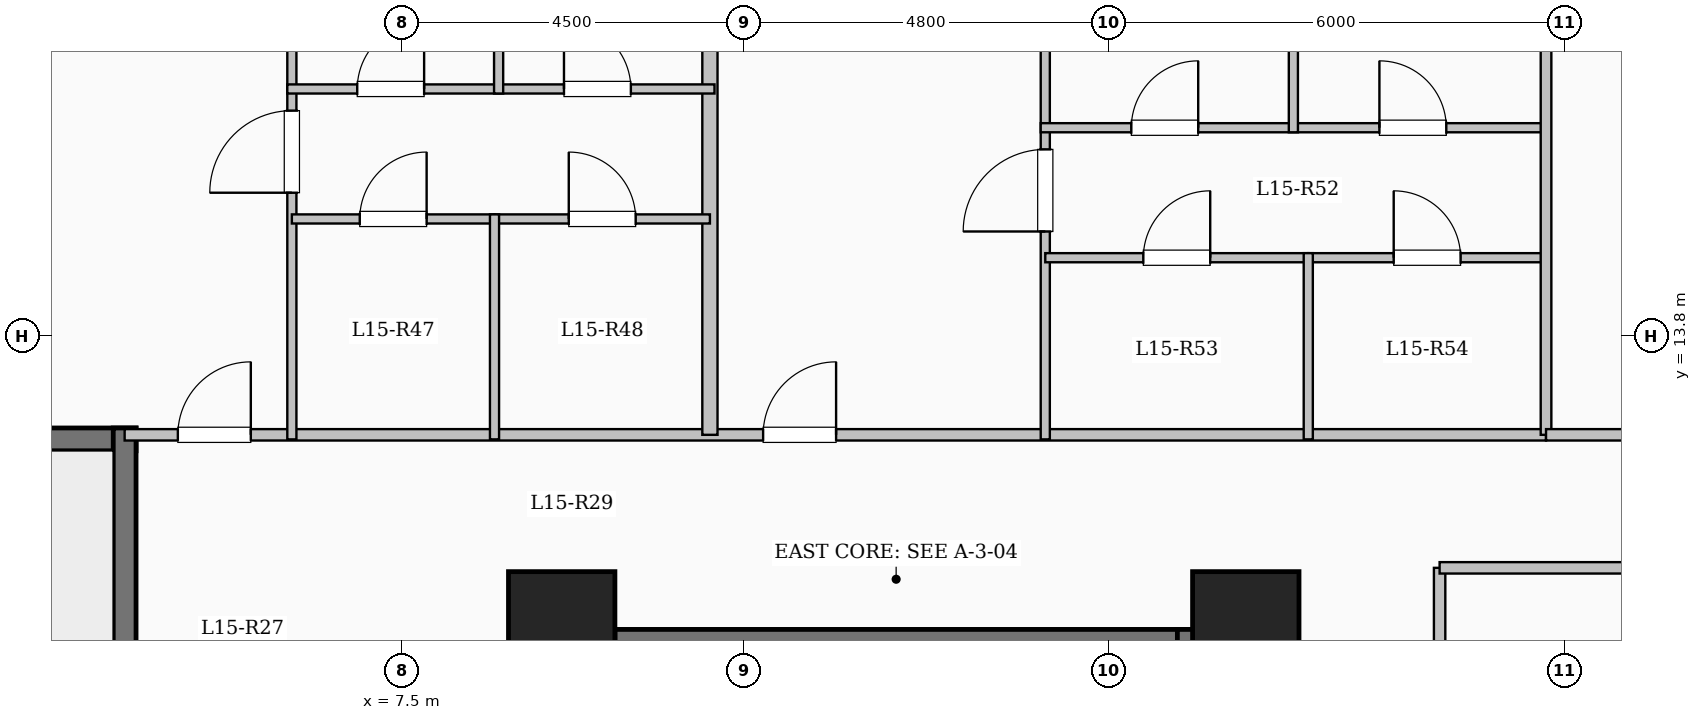
"""IFC4 building model, lengths in metres.
Left out: names, types, materials, properties, quantities, classifications, styles, units other than length and angle.
Written with IfcOpenShell. Run it as: python <this file> out.ifc"""

import sys

from ifc_helpers import new_model, si_unit, direction, frame, frame_2d, origin, origin_2d, place, context, subcontext, project, spatial, rectangle, extrude, element, fill, save


model = new_model("IFC4")
c1 = context("Model", 3, precision=1e-05, world=origin(), true_north=direction((0.0, 1.0)))
c2 = subcontext(c1, "Body", "Model", "MODEL_VIEW")
j1 = project(units=[si_unit("LENGTHUNIT", "METRE"), si_unit("PLANEANGLEUNIT", "RADIAN")], contexts=[c1])
p1 = place(None, origin())
s1 = spatial("IfcSite", under=j1, at=p1, CompositionType="ELEMENT")
p2 = place(p1, origin())
s2 = spatial("IfcBuilding", under=s1, at=p2, CompositionType="ELEMENT")
p3 = place(p2, frame((0.0, 0.0, 57.5)))
s3 = spatial("IfcBuildingStorey", under=s2, at=p3, CompositionType="ELEMENT", Elevation=57.5)
for number, where, z_axis, x_axis in (
    (1, (9.6, 10.0, 0.0), (0.0, 0.0, 1.0), (1.0, 0.0, 0.0)),
    (2, (18.6, 10.0, 0.0), (0.0, 0.0, 1.0), (1.0, 0.0, 0.0)),
):
    element("IfcColumn", number, at=place(p3, frame(where, z_axis=z_axis, x_axis=x_axis)), inside=s3, PredefinedType="COLUMN", context=c2, shape_type="SweptSolid", body=[
        extrude(rectangle(XDim=1.4, YDim=1.4, at=origin_2d()), origin(), (0.0, 0.0, 1.0), 3.35),
    ])
p4 = place(p3, frame((10.0, 9.79, 0.0), z_axis=(0.0, 0.0, 1.0), x_axis=(1.0, 0.0, 0.0)))
e3 = element("IfcWall", 3, at=p4, inside=s3, PredefinedType="SHEAR", context=c2, shape_type="SweptSolid", body=[
    extrude(rectangle(XDim=8.0, YDim=0.3, at=frame_2d((4.0, 0.0))), origin(), (0.0, 0.0, 1.0), 3.35),
])
for number, where, z_axis, x_axis in (
    (4, (10.15, 6.35, 0.0), (0.0, 0.0, 1.0), (0.0, 1.0, 0.0)),
    (5, (17.85, 6.35, 0.0), (0.0, 0.0, 1.0), (0.0, 1.0, 0.0)),
):
    element("IfcWall", number, at=place(p3, frame(where, z_axis=z_axis, x_axis=x_axis)), inside=s3, PredefinedType="SHEAR", context=c2, shape_type="SweptSolid", body=[
        extrude(rectangle(XDim=3.59, YDim=0.3, at=frame_2d((1.795, 0.0))), origin(), (0.0, 0.0, 1.0), 3.35),
    ])
p5 = place(p3, frame((-4.0, 12.44, 0.0), z_axis=(0.0, 0.0, 1.0), x_axis=(1.0, 0.0, 0.0)))
e6 = element("IfcWall", 6, at=p5, inside=s3, PredefinedType="SHEAR", context=c2, shape_type="SweptSolid", body=[
    extrude(rectangle(XDim=8.0, YDim=0.3, at=frame_2d((4.0, 0.0))), origin(), (0.0, 0.0, 1.0), 3.35),
])
p6 = place(p3, frame((3.85, 9.0, 0.0), z_axis=(0.0, 0.0, 1.0), x_axis=(0.0, 1.0, 0.0)))
e7 = element("IfcWall", 7, at=p6, inside=s3, PredefinedType="SHEAR", context=c2, shape_type="SweptSolid", body=[
    extrude(rectangle(XDim=3.59, YDim=0.3, at=frame_2d((1.795, 0.0))), origin(), (0.0, 0.0, 1.0), 3.35),
])
p7 = place(p3, frame((3.85, 12.5, 0.0), z_axis=(0.0, 0.0, 1.0), x_axis=(1.0, 0.0, 0.0)))
e8 = element("IfcWall", 8, at=p7, inside=s3, PredefinedType="PARTITIONING", context=c2, shape_type="SweptSolid", body=[
    extrude(rectangle(XDim=18.7, YDim=0.15, at=frame_2d((9.35, 0.0))), origin(), (0.0, 0.0, 1.0), 3.1),
])
p8 = place(p7, frame((0.7, 0.0, 0.0)))
e9 = element("IfcOpeningElement", 9, at=p8, cuts=e8, PredefinedType="OPENING", context=c2, shape_type="SweptSolid", body=[
    extrude(rectangle(XDim=0.96, YDim=2.15, at=frame_2d((0.48, 1.075))), frame((0.0, 0.085, 0.0), z_axis=(0.0, -1.0, 0.0), x_axis=(1.0, 0.0, 0.0)), (0.0, 0.0, 1.0), 0.17),
])
p9 = place(p7, frame((8.4, 0.0, 0.0)))
e10 = element("IfcOpeningElement", 10, at=p9, cuts=e8, PredefinedType="OPENING", context=c2, shape_type="SweptSolid", body=[
    extrude(rectangle(XDim=0.96, YDim=2.15, at=frame_2d((0.48, 1.075))), frame((0.0, 0.085, 0.0), z_axis=(0.0, -1.0, 0.0), x_axis=(1.0, 0.0, 0.0)), (0.0, 0.0, 1.0), 0.17),
])
p10 = place(p3, frame((21.15, -7.25, 0.0), z_axis=(0.0, 0.0, 1.0), x_axis=(0.0, 1.0, 0.0)))
e11 = element("IfcWall", 11, at=p10, inside=s3, PredefinedType="PARTITIONING", context=c2, shape_type="SweptSolid", body=[
    extrude(rectangle(XDim=18.0, YDim=0.15, at=frame_2d((9.0, 0.0))), origin(), (0.0, 0.0, 1.0), 2.585),
])
p11 = place(p3, frame((11.55, 12.5, 0.0), z_axis=(0.0, 0.0, 1.0), x_axis=(0.0, 1.0, 0.0)))
e12 = element("IfcWall", 12, at=p11, inside=s3, PredefinedType="SOLIDWALL", context=c2, shape_type="SweptSolid", body=[
    extrude(rectangle(XDim=11.1, YDim=0.2, at=frame_2d((5.55, 0.0))), origin(), (0.0, 0.0, 1.0), 3.1),
])
p12 = place(p3, frame((6.05, 12.44, 0.0), z_axis=(0.0, 0.0, 1.0), x_axis=(0.0, 1.0, 0.0)))
e13 = element("IfcWall", 13, at=p12, inside=s3, PredefinedType="PARTITIONING", context=c2, shape_type="SweptSolid", body=[
    extrude(rectangle(XDim=12.381, YDim=0.12, at=frame_2d((6.19, 0.0))), origin(), (0.0, 0.0, 1.0), 3.1),
])
p13 = place(p12, frame((3.245, 0.0, 0.0)))
e14 = element("IfcOpeningElement", 14, at=p13, cuts=e13, PredefinedType="OPENING", context=c2, shape_type="SweptSolid", body=[
    extrude(rectangle(XDim=1.08, YDim=2.15, at=frame_2d((0.54, 1.075))), frame((0.0, 0.07, 0.0), z_axis=(0.0, -1.0, 0.0), x_axis=(1.0, 0.0, 0.0)), (0.0, 0.0, 1.0), 0.14),
])
p14 = place(p3, frame((6.05, 15.34, 0.0), z_axis=(0.0, 0.0, 1.0), x_axis=(1.0, 0.0, 0.0)))
e15 = element("IfcWall", 15, at=p14, inside=s3, PredefinedType="PARTITIONING", context=c2, shape_type="SweptSolid", body=[
    extrude(rectangle(XDim=2.666, YDim=0.12, at=frame_2d((1.333, 0.0))), origin(), (0.0, 0.0, 1.0), 3.1),
])
p15 = place(p14, frame((0.893, 0.0, 0.0)))
e16 = element("IfcOpeningElement", 16, at=p15, cuts=e15, PredefinedType="OPENING", context=c2, shape_type="SweptSolid", body=[
    extrude(rectangle(XDim=0.88, YDim=2.1, at=frame_2d((0.44, 1.05))), frame((0.0, 0.07, 0.0), z_axis=(0.0, -1.0, 0.0), x_axis=(1.0, 0.0, 0.0)), (0.0, 0.0, 1.0), 0.14),
])
p16 = place(p3, frame((8.716, 15.34, 0.0), z_axis=(0.0, 0.0, 1.0), x_axis=(1.0, 0.0, 0.0)))
e17 = element("IfcWall", 17, at=p16, inside=s3, PredefinedType="PARTITIONING", context=c2, shape_type="SweptSolid", body=[
    extrude(rectangle(XDim=2.834, YDim=0.12, at=frame_2d((1.417, 0.0))), origin(), (0.0, 0.0, 1.0), 3.1),
])
p17 = place(p16, frame((0.977, 0.0, 0.0)))
e18 = element("IfcOpeningElement", 18, at=p17, cuts=e17, PredefinedType="OPENING", context=c2, shape_type="SweptSolid", body=[
    extrude(rectangle(XDim=0.88, YDim=2.1, at=frame_2d((0.44, 1.05))), frame((0.0, 0.07, 0.0), z_axis=(0.0, -1.0, 0.0), x_axis=(1.0, 0.0, 0.0)), (0.0, 0.0, 1.0), 0.14),
])
p18 = place(p3, frame((5.99, 17.05, 0.0), z_axis=(0.0, 0.0, 1.0), x_axis=(1.0, 0.0, 0.0)))
e19 = element("IfcWall", 19, at=p18, inside=s3, PredefinedType="PARTITIONING", context=c2, shape_type="SweptSolid", body=[
    extrude(rectangle(XDim=5.62, YDim=0.12, at=frame_2d((2.81, 0.0))), origin(), (0.0, 0.0, 1.0), 3.1),
])
p19 = place(p18, frame((0.92, 0.0, 0.0)))
e20 = element("IfcOpeningElement", 20, at=p19, cuts=e19, PredefinedType="OPENING", context=c2, shape_type="SweptSolid", body=[
    extrude(rectangle(XDim=0.88, YDim=2.1, at=frame_2d((0.44, 1.05))), frame((0.0, 0.07, 0.0), z_axis=(0.0, -1.0, 0.0), x_axis=(1.0, 0.0, 0.0)), (0.0, 0.0, 1.0), 0.14),
])
p20 = place(p18, frame((3.64, 0.0, 0.0)))
e21 = element("IfcOpeningElement", 21, at=p20, cuts=e19, PredefinedType="OPENING", context=c2, shape_type="SweptSolid", body=[
    extrude(rectangle(XDim=0.88, YDim=2.1, at=frame_2d((0.44, 1.05))), frame((0.0, 0.07, 0.0), z_axis=(0.0, -1.0, 0.0), x_axis=(1.0, 0.0, 0.0)), (0.0, 0.0, 1.0), 0.14),
])
p21 = place(p3, frame((8.716, 12.44, 0.0), z_axis=(0.0, 0.0, 1.0), x_axis=(0.0, 1.0, 0.0)))
e22 = element("IfcWall", 22, at=p21, inside=s3, PredefinedType="PARTITIONING", context=c2, shape_type="SweptSolid", body=[
    extrude(rectangle(XDim=2.96, YDim=0.12, at=frame_2d((1.48, 0.0))), origin(), (0.0, 0.0, 1.0), 3.1),
])
p22 = place(p3, frame((8.77, 16.99, 0.0), z_axis=(0.0, 0.0, 1.0), x_axis=(0.0, 1.0, 0.0)))
e23 = element("IfcWall", 23, at=p22, inside=s3, PredefinedType="PARTITIONING", context=c2, shape_type="SweptSolid", body=[
    extrude(rectangle(XDim=7.16, YDim=0.12, at=frame_2d((3.58, 0.0))), origin(), (0.0, 0.0, 1.0), 3.1),
])
p23 = place(p3, frame((15.962, 12.44, 0.0), z_axis=(0.0, 0.0, 1.0), x_axis=(0.0, 1.0, 0.0)))
e24 = element("IfcWall", 24, at=p23, inside=s3, PredefinedType="PARTITIONING", context=c2, shape_type="SweptSolid", body=[
    extrude(rectangle(XDim=11.16, YDim=0.12, at=frame_2d((5.58, 0.0))), origin(), (0.0, 0.0, 1.0), 3.1),
])
p24 = place(p23, frame((2.735, 0.0, 0.0)))
e25 = element("IfcOpeningElement", 25, at=p24, cuts=e24, PredefinedType="OPENING", context=c2, shape_type="SweptSolid", body=[
    extrude(rectangle(XDim=1.08, YDim=2.15, at=frame_2d((0.54, 1.075))), frame((0.0, 0.07, 0.0), z_axis=(0.0, -1.0, 0.0), x_axis=(1.0, 0.0, 0.0)), (0.0, 0.0, 1.0), 0.14),
])
p25 = place(p3, frame((15.962, 14.83, 0.0), z_axis=(0.0, 0.0, 1.0), x_axis=(1.0, 0.0, 0.0)))
e26 = element("IfcWall", 26, at=p25, inside=s3, PredefinedType="PARTITIONING", context=c2, shape_type="SweptSolid", body=[
    extrude(rectangle(XDim=3.46, YDim=0.12, at=frame_2d((1.73, 0.0))), origin(), (0.0, 0.0, 1.0), 3.1),
])
p26 = place(p25, frame((1.29, 0.0, 0.0)))
e27 = element("IfcOpeningElement", 27, at=p26, cuts=e26, PredefinedType="OPENING", context=c2, shape_type="SweptSolid", body=[
    extrude(rectangle(XDim=0.88, YDim=2.1, at=frame_2d((0.44, 1.05))), frame((0.0, 0.07, 0.0), z_axis=(0.0, -1.0, 0.0), x_axis=(1.0, 0.0, 0.0)), (0.0, 0.0, 1.0), 0.14),
])
p27 = place(p3, frame((19.422, 14.83, 0.0), z_axis=(0.0, 0.0, 1.0), x_axis=(1.0, 0.0, 0.0)))
e28 = element("IfcWall", 28, at=p27, inside=s3, PredefinedType="PARTITIONING", context=c2, shape_type="SweptSolid", body=[
    extrude(rectangle(XDim=3.128, YDim=0.12, at=frame_2d((1.564, 0.0))), origin(), (0.0, 0.0, 1.0), 3.1),
])
p28 = place(p27, frame((1.124, 0.0, 0.0)))
e29 = element("IfcOpeningElement", 29, at=p28, cuts=e28, PredefinedType="OPENING", context=c2, shape_type="SweptSolid", body=[
    extrude(rectangle(XDim=0.88, YDim=2.1, at=frame_2d((0.44, 1.05))), frame((0.0, 0.07, 0.0), z_axis=(0.0, -1.0, 0.0), x_axis=(1.0, 0.0, 0.0)), (0.0, 0.0, 1.0), 0.14),
])
p29 = place(p3, frame((15.902, 16.54, 0.0), z_axis=(0.0, 0.0, 1.0), x_axis=(1.0, 0.0, 0.0)))
e30 = element("IfcWall", 30, at=p29, inside=s3, PredefinedType="PARTITIONING", context=c2, shape_type="SweptSolid", body=[
    extrude(rectangle(XDim=6.708, YDim=0.12, at=frame_2d((3.354, 0.0))), origin(), (0.0, 0.0, 1.0), 3.1),
])
p30 = place(p29, frame((1.192, 0.0, 0.0)))
e31 = element("IfcOpeningElement", 31, at=p30, cuts=e30, PredefinedType="OPENING", context=c2, shape_type="SweptSolid", body=[
    extrude(rectangle(XDim=0.88, YDim=2.1, at=frame_2d((0.44, 1.05))), frame((0.0, 0.07, 0.0), z_axis=(0.0, -1.0, 0.0), x_axis=(1.0, 0.0, 0.0)), (0.0, 0.0, 1.0), 0.14),
])
p31 = place(p29, frame((4.456, 0.0, 0.0)))
e32 = element("IfcOpeningElement", 32, at=p31, cuts=e30, PredefinedType="OPENING", context=c2, shape_type="SweptSolid", body=[
    extrude(rectangle(XDim=0.88, YDim=2.1, at=frame_2d((0.44, 1.05))), frame((0.0, 0.07, 0.0), z_axis=(0.0, -1.0, 0.0), x_axis=(1.0, 0.0, 0.0)), (0.0, 0.0, 1.0), 0.14),
])
p32 = place(p3, frame((19.422, 12.44, 0.0), z_axis=(0.0, 0.0, 1.0), x_axis=(0.0, 1.0, 0.0)))
e33 = element("IfcWall", 33, at=p32, inside=s3, PredefinedType="PARTITIONING", context=c2, shape_type="SweptSolid", body=[
    extrude(rectangle(XDim=2.45, YDim=0.12, at=frame_2d((1.225, 0.0))), origin(), (0.0, 0.0, 1.0), 3.1),
])
p33 = place(p3, frame((19.226, 16.48, 0.0), z_axis=(0.0, 0.0, 1.0), x_axis=(0.0, 1.0, 0.0)))
e34 = element("IfcWall", 34, at=p33, inside=s3, PredefinedType="PARTITIONING", context=c2, shape_type="SweptSolid", body=[
    extrude(rectangle(XDim=7.12, YDim=0.12, at=frame_2d((3.56, 0.0))), origin(), (0.0, 0.0, 1.0), 3.1),
])
p34 = place(p3, frame((21.15, 10.75, 0.0), z_axis=(0.0, 0.0, 1.0), x_axis=(1.0, 0.0, 0.0)))
e35 = element("IfcWall", 35, at=p34, inside=s3, PredefinedType="PARTITIONING", context=c2, shape_type="SweptSolid", body=[
    extrude(rectangle(XDim=7.53, YDim=0.15, at=frame_2d((3.765, 0.0))), origin(), (0.0, 0.0, 1.0), 3.1),
])
p35 = place(p3, frame((22.55, 12.5, 0.0), z_axis=(0.0, 0.0, 1.0), x_axis=(0.0, 1.0, 0.0)))
e36 = element("IfcWall", 36, at=p35, inside=s3, PredefinedType="PARTITIONING", context=c2, shape_type="SweptSolid", body=[
    extrude(rectangle(XDim=6.55, YDim=0.14, at=frame_2d((3.275, 0.0))), origin(), (0.0, 0.0, 1.0), 3.1),
])
p36 = place(p3, frame((22.55, 12.5, 0.0), z_axis=(0.0, 0.0, 1.0), x_axis=(1.0, 0.0, 0.0)))
e37 = element("IfcWall", 37, at=p36, inside=s3, PredefinedType="PARTITIONING", context=c2, shape_type="SweptSolid", body=[
    extrude(rectangle(XDim=6.13, YDim=0.15, at=frame_2d((3.065, 0.0))), origin(), (0.0, 0.0, 1.0), 3.1),
])
p37 = place(p36, frame((2.59, 0.0, 0.0)))
e38 = element("IfcOpeningElement", 38, at=p37, cuts=e37, PredefinedType="OPENING", context=c2, shape_type="SweptSolid", body=[
    extrude(rectangle(XDim=0.95, YDim=2.15, at=frame_2d((0.475, 1.075))), frame((0.0, 0.085, 0.0), z_axis=(0.0, -1.0, 0.0), x_axis=(1.0, 0.0, 0.0)), (0.0, 0.0, 1.0), 0.17),
])
p38 = place(p8, origin())
e39 = element("IfcDoor", 39, at=p38, inside=s3, OperationType="SINGLE_SWING_RIGHT", PredefinedType="DOOR", context=c2, shape_type="SweptSolid", body=[
    extrude(rectangle(XDim=0.96, YDim=2.15, at=frame_2d((0.48, 1.075))), frame((0.0, 0.025, 0.0), z_axis=(0.0, -1.0, 0.0), x_axis=(1.0, 0.0, 0.0)), (0.0, 0.0, 1.0), 0.05),
])
fill(e9, e39)
p39 = place(p13, origin())
e40 = element("IfcDoor", 40, at=p39, inside=s3, OperationType="SINGLE_SWING_LEFT", PredefinedType="DOOR", context=c2, shape_type="SweptSolid", body=[
    extrude(rectangle(XDim=1.08, YDim=2.15, at=frame_2d((0.54, 1.075))), frame((0.0, 0.025, 0.0), z_axis=(0.0, -1.0, 0.0), x_axis=(1.0, 0.0, 0.0)), (0.0, 0.0, 1.0), 0.05),
])
fill(e14, e40)
p40 = place(p15, origin())
e41 = element("IfcDoor", 41, at=p40, inside=s3, OperationType="SINGLE_SWING_RIGHT", PredefinedType="DOOR", context=c2, shape_type="SweptSolid", body=[
    extrude(rectangle(XDim=0.88, YDim=2.1, at=frame_2d((0.44, 1.05))), frame((0.0, 0.025, 0.0), z_axis=(0.0, -1.0, 0.0), x_axis=(1.0, 0.0, 0.0)), (0.0, 0.0, 1.0), 0.05),
])
fill(e16, e41)
p41 = place(p17, origin())
e42 = element("IfcDoor", 42, at=p41, inside=s3, OperationType="SINGLE_SWING_LEFT", PredefinedType="DOOR", context=c2, shape_type="SweptSolid", body=[
    extrude(rectangle(XDim=0.88, YDim=2.1, at=frame_2d((0.44, 1.05))), frame((0.0, 0.025, 0.0), z_axis=(0.0, -1.0, 0.0), x_axis=(1.0, 0.0, 0.0)), (0.0, 0.0, 1.0), 0.05),
])
fill(e18, e42)
p42 = place(p19, origin())
e43 = element("IfcDoor", 43, at=p42, inside=s3, OperationType="SINGLE_SWING_RIGHT", PredefinedType="DOOR", context=c2, shape_type="SweptSolid", body=[
    extrude(rectangle(XDim=0.88, YDim=2.1, at=frame_2d((0.44, 1.05))), frame((0.0, 0.025, 0.0), z_axis=(0.0, -1.0, 0.0), x_axis=(1.0, 0.0, 0.0)), (0.0, 0.0, 1.0), 0.05),
])
fill(e20, e43)
p43 = place(p20, origin())
e44 = element("IfcDoor", 44, at=p43, inside=s3, OperationType="SINGLE_SWING_LEFT", PredefinedType="DOOR", context=c2, shape_type="SweptSolid", body=[
    extrude(rectangle(XDim=0.88, YDim=2.1, at=frame_2d((0.44, 1.05))), frame((0.0, 0.025, 0.0), z_axis=(0.0, -1.0, 0.0), x_axis=(1.0, 0.0, 0.0)), (0.0, 0.0, 1.0), 0.05),
])
fill(e21, e44)
p44 = place(p9, origin())
e45 = element("IfcDoor", 45, at=p44, inside=s3, OperationType="SINGLE_SWING_RIGHT", PredefinedType="DOOR", context=c2, shape_type="SweptSolid", body=[
    extrude(rectangle(XDim=0.96, YDim=2.15, at=frame_2d((0.48, 1.075))), frame((0.0, 0.025, 0.0), z_axis=(0.0, -1.0, 0.0), x_axis=(1.0, 0.0, 0.0)), (0.0, 0.0, 1.0), 0.05),
])
fill(e10, e45)
p45 = place(p24, origin())
e46 = element("IfcDoor", 46, at=p45, inside=s3, OperationType="SINGLE_SWING_LEFT", PredefinedType="DOOR", context=c2, shape_type="SweptSolid", body=[
    extrude(rectangle(XDim=1.08, YDim=2.15, at=frame_2d((0.54, 1.075))), frame((0.0, 0.025, 0.0), z_axis=(0.0, -1.0, 0.0), x_axis=(1.0, 0.0, 0.0)), (0.0, 0.0, 1.0), 0.05),
])
fill(e25, e46)
p46 = place(p26, origin())
e47 = element("IfcDoor", 47, at=p46, inside=s3, OperationType="SINGLE_SWING_RIGHT", PredefinedType="DOOR", context=c2, shape_type="SweptSolid", body=[
    extrude(rectangle(XDim=0.88, YDim=2.1, at=frame_2d((0.44, 1.05))), frame((0.0, 0.025, 0.0), z_axis=(0.0, -1.0, 0.0), x_axis=(1.0, 0.0, 0.0)), (0.0, 0.0, 1.0), 0.05),
])
fill(e27, e47)
p47 = place(p28, origin())
e48 = element("IfcDoor", 48, at=p47, inside=s3, OperationType="SINGLE_SWING_LEFT", PredefinedType="DOOR", context=c2, shape_type="SweptSolid", body=[
    extrude(rectangle(XDim=0.88, YDim=2.1, at=frame_2d((0.44, 1.05))), frame((0.0, 0.025, 0.0), z_axis=(0.0, -1.0, 0.0), x_axis=(1.0, 0.0, 0.0)), (0.0, 0.0, 1.0), 0.05),
])
fill(e29, e48)
p48 = place(p30, origin())
e49 = element("IfcDoor", 49, at=p48, inside=s3, OperationType="SINGLE_SWING_RIGHT", PredefinedType="DOOR", context=c2, shape_type="SweptSolid", body=[
    extrude(rectangle(XDim=0.88, YDim=2.1, at=frame_2d((0.44, 1.05))), frame((0.0, 0.025, 0.0), z_axis=(0.0, -1.0, 0.0), x_axis=(1.0, 0.0, 0.0)), (0.0, 0.0, 1.0), 0.05),
])
fill(e31, e49)
p49 = place(p31, origin())
e50 = element("IfcDoor", 50, at=p49, inside=s3, OperationType="SINGLE_SWING_LEFT", PredefinedType="DOOR", context=c2, shape_type="SweptSolid", body=[
    extrude(rectangle(XDim=0.88, YDim=2.1, at=frame_2d((0.44, 1.05))), frame((0.0, 0.025, 0.0), z_axis=(0.0, -1.0, 0.0), x_axis=(1.0, 0.0, 0.0)), (0.0, 0.0, 1.0), 0.05),
])
fill(e32, e50)
save(model, sys.argv[1])
